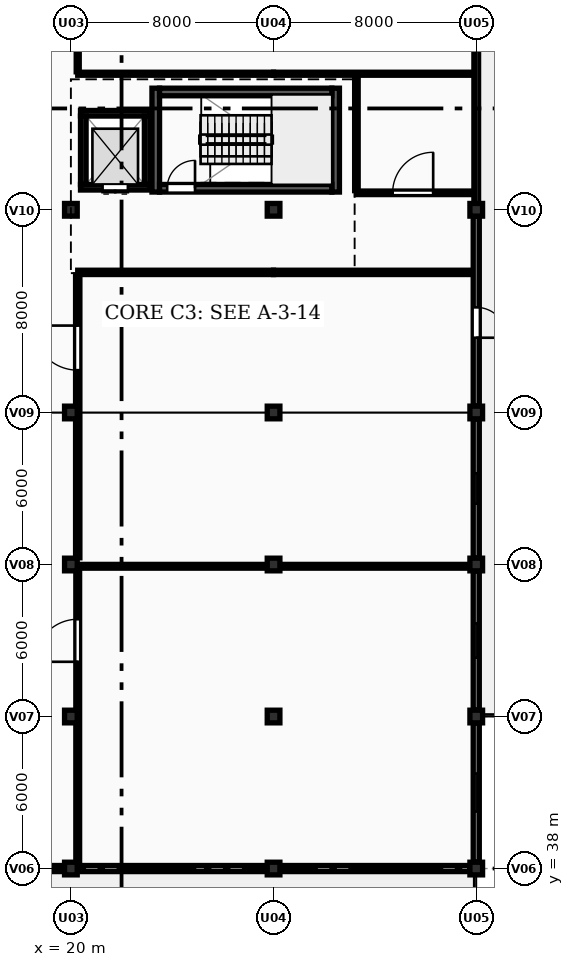
"""IFC4 building model, lengths in metres.
Left out: names, types, materials, properties, quantities, classifications, styles, units other than length and angle.
Written with IfcOpenShell. Run it as: python <this file> out.ifc"""

import sys

from ifc_helpers import new_model, si_unit, direction, frame, frame_2d, origin, origin_2d, place, context, subcontext, project, spatial, rectangle, extrude, element, fill, save


model = new_model("IFC4")
c1 = context("Model", 3, precision=1e-05, world=origin(), true_north=direction((0.0, 1.0)))
c2 = subcontext(c1, "Body", "Model", "MODEL_VIEW")
j1 = project(units=[si_unit("LENGTHUNIT", "METRE"), si_unit("PLANEANGLEUNIT", "RADIAN")], contexts=[c1])
p1 = place(None, origin())
s1 = spatial("IfcSite", under=j1, at=p1, CompositionType="ELEMENT")
p2 = place(p1, origin())
s2 = spatial("IfcBuilding", under=s1, at=p2, CompositionType="ELEMENT")
p3 = place(p2, frame((0.0, 0.0, 4.5)))
s3 = spatial("IfcBuildingStorey", under=s2, at=p3, CompositionType="ELEMENT", Elevation=4.5)
for number, where, z_axis, x_axis in (
    (1, (20.0, 38.0, 0.0), (0.0, 0.0, 1.0), (1.0, 0.0, 0.0)),
    (2, (20.0, 44.0, 0.0), (0.0, 0.0, 1.0), (1.0, 0.0, 0.0)),
    (3, (20.0, 50.0, 0.0), (0.0, 0.0, 1.0), (1.0, 0.0, 0.0)),
    (4, (20.0, 56.0, 0.0), (0.0, 0.0, 1.0), (1.0, 0.0, 0.0)),
    (5, (20.0, 64.0, 0.0), (0.0, 0.0, 1.0), (1.0, 0.0, 0.0)),
    (6, (28.0, 38.0, 0.0), (0.0, 0.0, 1.0), (1.0, 0.0, 0.0)),
    (7, (28.0, 44.0, 0.0), (0.0, 0.0, 1.0), (1.0, 0.0, 0.0)),
    (8, (28.0, 50.0, 0.0), (0.0, 0.0, 1.0), (1.0, 0.0, 0.0)),
    (9, (28.0, 56.0, 0.0), (0.0, 0.0, 1.0), (1.0, 0.0, 0.0)),
    (10, (28.0, 64.0, 0.0), (0.0, 0.0, 1.0), (1.0, 0.0, 0.0)),
    (11, (36.0, 38.0, 0.0), (0.0, 0.0, 1.0), (1.0, 0.0, 0.0)),
    (12, (36.0, 44.0, 0.0), (0.0, 0.0, 1.0), (1.0, 0.0, 0.0)),
    (13, (36.0, 50.0, 0.0), (0.0, 0.0, 1.0), (1.0, 0.0, 0.0)),
    (14, (36.0, 56.0, 0.0), (0.0, 0.0, 1.0), (1.0, 0.0, 0.0)),
    (15, (36.0, 64.0, 0.0), (0.0, 0.0, 1.0), (1.0, 0.0, 0.0)),
):
    element("IfcColumn", number, at=place(p3, frame(where, z_axis=z_axis, x_axis=x_axis)), inside=s3, PredefinedType="COLUMN", context=c2, shape_type="SweptSolid", body=[
        extrude(rectangle(XDim=0.5, YDim=0.5, at=origin_2d()), origin(), (0.0, 0.0, 1.0), 3.9),
    ])
p4 = place(p3, frame((36.0, 71.75, 0.0), z_axis=(0.0, 0.0, 1.0), x_axis=(0.0, -1.0, 0.0)))
e16 = element("IfcWall", 16, at=p4, inside=s3, PredefinedType="SOLIDWALL", context=c2, shape_type="SweptSolid", body=[
    extrude(rectangle(XDim=7.5, YDim=0.185, at=frame_2d((3.75, 0.0))), origin(), (0.0, 0.0, 1.0), 0.95),
])
p5 = place(p3, frame((36.0, 63.75, 0.0), z_axis=(0.0, 0.0, 1.0), x_axis=(0.0, -1.0, 0.0)))
e17 = element("IfcWall", 17, at=p5, inside=s3, PredefinedType="SOLIDWALL", context=c2, shape_type="SweptSolid", body=[
    extrude(rectangle(XDim=7.5, YDim=0.24, at=frame_2d((3.75, 0.0))), origin(), (0.0, 0.0, 1.0), 3.0),
])
p6 = place(p5, frame((3.6, 0.0, 0.0)))
e18 = element("IfcOpeningElement", 18, at=p6, cuts=e17, PredefinedType="OPENING", context=c2, shape_type="SweptSolid", body=[
    extrude(rectangle(XDim=1.2, YDim=2.15, at=frame_2d((0.6, 1.075))), frame((0.0, 0.13, 0.0), z_axis=(0.0, -1.0, 0.0), x_axis=(1.0, 0.0, 0.0)), (0.0, 0.0, 1.0), 0.26),
])
p7 = place(p3, frame((36.0, 55.75, 0.0), z_axis=(0.0, 0.0, 1.0), x_axis=(0.0, -1.0, 0.0)))
e19 = element("IfcWall", 19, at=p7, inside=s3, PredefinedType="SOLIDWALL", context=c2, shape_type="SweptSolid", body=[
    extrude(rectangle(XDim=5.5, YDim=0.24, at=frame_2d((2.75, 0.0))), origin(), (0.0, 0.0, 1.0), 3.0),
])
p8 = place(p7, frame((2.15, 0.0, 0.95)))
e20 = element("IfcOpeningElement", 20, at=p8, cuts=e19, PredefinedType="OPENING", context=c2, shape_type="SweptSolid", body=[
    extrude(rectangle(XDim=1.2, YDim=1.5, at=frame_2d((0.6, 0.75))), frame((0.0, 0.13, 0.0), z_axis=(0.0, -1.0, 0.0), x_axis=(1.0, 0.0, 0.0)), (0.0, 0.0, 1.0), 0.26),
])
p9 = place(p3, frame((36.0, 49.75, 0.0), z_axis=(0.0, 0.0, 1.0), x_axis=(0.0, -1.0, 0.0)))
e21 = element("IfcWall", 21, at=p9, inside=s3, PredefinedType="SOLIDWALL", context=c2, shape_type="SweptSolid", body=[
    extrude(rectangle(XDim=5.5, YDim=0.24, at=frame_2d((2.75, 0.0))), origin(), (0.0, 0.0, 1.0), 3.0),
])
p10 = place(p9, frame((2.075, 0.0, 0.95)))
e22 = element("IfcOpeningElement", 22, at=p10, cuts=e21, PredefinedType="OPENING", context=c2, shape_type="SweptSolid", body=[
    extrude(rectangle(XDim=1.35, YDim=1.5, at=frame_2d((0.675, 0.75))), frame((0.0, 0.13, 0.0), z_axis=(0.0, -1.0, 0.0), x_axis=(1.0, 0.0, 0.0)), (0.0, 0.0, 1.0), 0.26),
])
p11 = place(p3, frame((36.0, 43.75, 0.0), z_axis=(0.0, 0.0, 1.0), x_axis=(0.0, -1.0, 0.0)))
e23 = element("IfcWall", 23, at=p11, inside=s3, PredefinedType="SOLIDWALL", context=c2, shape_type="SweptSolid", body=[
    extrude(rectangle(XDim=5.5, YDim=0.24, at=frame_2d((2.75, 0.0))), origin(), (0.0, 0.0, 1.0), 2.998),
])
p12 = place(p11, frame((2.0, 0.0, 0.95)))
e24 = element("IfcOpeningElement", 24, at=p12, cuts=e23, PredefinedType="OPENING", context=c2, shape_type="SweptSolid", body=[
    extrude(rectangle(XDim=1.5, YDim=1.5, at=frame_2d((0.75, 0.75))), frame((0.0, 0.13, 0.0), z_axis=(0.0, -1.0, 0.0), x_axis=(1.0, 0.0, 0.0)), (0.0, 0.0, 1.0), 0.26),
])
p13 = place(p3, frame((35.75, 38.0, 0.0), z_axis=(0.0, 0.0, 1.0), x_axis=(-1.0, 0.0, 0.0)))
e25 = element("IfcWall", 25, at=p13, inside=s3, PredefinedType="SOLIDWALL", context=c2, shape_type="SweptSolid", body=[
    extrude(rectangle(XDim=7.5, YDim=0.24, at=frame_2d((3.75, 0.0))), origin(), (0.0, 0.0, 1.0), 2.998),
])
p14 = place(p13, frame((2.925, 0.0, 0.95)))
e26 = element("IfcOpeningElement", 26, at=p14, cuts=e25, PredefinedType="OPENING", context=c2, shape_type="SweptSolid", body=[
    extrude(rectangle(XDim=1.65, YDim=1.5, at=frame_2d((0.825, 0.75))), frame((0.0, 0.13, 0.0), z_axis=(0.0, -1.0, 0.0), x_axis=(1.0, 0.0, 0.0)), (0.0, 0.0, 1.0), 0.26),
])
p15 = place(p3, frame((27.75, 38.0, 0.0), z_axis=(0.0, 0.0, 1.0), x_axis=(-1.0, 0.0, 0.0)))
e27 = element("IfcWall", 27, at=p15, inside=s3, PredefinedType="SOLIDWALL", context=c2, shape_type="SweptSolid", body=[
    extrude(rectangle(XDim=7.5, YDim=0.24, at=frame_2d((3.75, 0.0))), origin(), (0.0, 0.0, 1.0), 2.998),
])
p16 = place(p15, frame((2.85, 0.0, 0.95)))
e28 = element("IfcOpeningElement", 28, at=p16, cuts=e27, PredefinedType="OPENING", context=c2, shape_type="SweptSolid", body=[
    extrude(rectangle(XDim=1.8, YDim=1.5, at=frame_2d((0.9, 0.75))), frame((0.0, 0.13, 0.0), z_axis=(0.0, -1.0, 0.0), x_axis=(1.0, 0.0, 0.0)), (0.0, 0.0, 1.0), 0.26),
])
p17 = place(p3, frame((19.75, 38.0, 0.0), z_axis=(0.0, 0.0, 1.0), x_axis=(-1.0, 0.0, 0.0)))
e29 = element("IfcWall", 29, at=p17, inside=s3, PredefinedType="SOLIDWALL", context=c2, shape_type="SweptSolid", body=[
    extrude(rectangle(XDim=7.5, YDim=0.24, at=frame_2d((3.75, 0.0))), origin(), (0.0, 0.0, 1.0), 2.998),
])
for number, where, z_axis, x_axis in (
    (30, (23.35, 64.7, 0.0), (0.0, 0.0, 1.0), (0.0, 1.0, 0.0)),
    (31, (30.45, 68.8, 0.0), (0.0, 0.0, 1.0), (0.0, -1.0, 0.0)),
):
    element("IfcWall", number, at=place(p3, frame(where, z_axis=z_axis, x_axis=x_axis)), inside=s3, PredefinedType="SHEAR", context=c2, shape_type="SweptSolid", body=[
        extrude(rectangle(XDim=4.1, YDim=0.3, at=frame_2d((2.05, 0.0))), origin(), (0.0, 0.0, 1.0), 3.65),
    ])
p18 = place(p3, frame((23.5, 64.85, 0.0), z_axis=(0.0, 0.0, 1.0), x_axis=(1.0, 0.0, 0.0)))
e32 = element("IfcWall", 32, at=p18, inside=s3, PredefinedType="SHEAR", context=c2, shape_type="SweptSolid", body=[
    extrude(rectangle(XDim=6.8, YDim=0.3, at=frame_2d((3.4, 0.0))), origin(), (0.0, 0.0, 1.0), 3.65),
])
p19 = place(p18, frame((0.3, 0.0, 0.0)))
e33 = element("IfcOpeningElement", 33, at=p19, cuts=e32, PredefinedType="OPENING", context=c2, shape_type="SweptSolid", body=[
    extrude(rectangle(XDim=1.1, YDim=2.15, at=frame_2d((0.55, 1.075))), frame((0.0, 0.16, 0.0), z_axis=(0.0, -1.0, 0.0), x_axis=(1.0, 0.0, 0.0)), (0.0, 0.0, 1.0), 0.32),
])
p20 = place(p3, frame((30.3, 68.65, 0.0), z_axis=(0.0, 0.0, 1.0), x_axis=(-1.0, 0.0, 0.0)))
e34 = element("IfcWall", 34, at=p20, inside=s3, PredefinedType="SHEAR", context=c2, shape_type="SweptSolid", body=[
    extrude(rectangle(XDim=6.8, YDim=0.3, at=frame_2d((3.4, 0.0))), origin(), (0.0, 0.0, 1.0), 3.65),
])
p21 = place(p3, frame((23.12, 64.89, 0.0), z_axis=(0.0, 0.0, 1.0), x_axis=(-1.0, 0.0, 0.0)))
e35 = element("IfcWall", 35, at=p21, inside=s3, PredefinedType="SHEAR", context=c2, shape_type="SweptSolid", body=[
    extrude(rectangle(XDim=2.74, YDim=0.22, at=frame_2d((1.37, 0.0))), origin(), (0.0, 0.0, 1.0), 3.65),
])
p22 = place(p21, frame((0.87, 0.0, 0.0)))
e36 = element("IfcOpeningElement", 36, at=p22, cuts=e35, PredefinedType="OPENING", context=c2, shape_type="SweptSolid", body=[
    extrude(rectangle(XDim=1.0, YDim=2.15, at=frame_2d((0.5, 1.075))), frame((0.0, 0.12, 0.0), z_axis=(0.0, -1.0, 0.0), x_axis=(1.0, 0.0, 0.0)), (0.0, 0.0, 1.0), 0.24),
])
p23 = place(p3, frame((20.38, 67.81, 0.0), z_axis=(0.0, 0.0, 1.0), x_axis=(1.0, 0.0, 0.0)))
e37 = element("IfcWall", 37, at=p23, inside=s3, PredefinedType="SHEAR", context=c2, shape_type="SweptSolid", body=[
    extrude(rectangle(XDim=2.74, YDim=0.22, at=frame_2d((1.37, 0.0))), origin(), (0.0, 0.0, 1.0), 3.65),
])
for number, where, z_axis, x_axis in (
    (38, (20.49, 65.0, 0.0), (0.0, 0.0, 1.0), (0.0, 1.0, 0.0)),
    (39, (23.01, 67.7, 0.0), (0.0, 0.0, 1.0), (0.0, -1.0, 0.0)),
):
    element("IfcWall", number, at=place(p3, frame(where, z_axis=z_axis, x_axis=x_axis)), inside=s3, PredefinedType="SHEAR", context=c2, shape_type="SweptSolid", body=[
        extrude(rectangle(XDim=2.7, YDim=0.22, at=frame_2d((1.35, 0.0))), origin(), (0.0, 0.0, 1.0), 3.65),
    ])
p24 = place(p3, frame((20.27, 69.37, 0.0), z_axis=(0.0, 0.0, 1.0), x_axis=(1.0, 0.0, 0.0)))
e40 = element("IfcWall", 40, at=p24, inside=s3, PredefinedType="PARTITIONING", context=c2, shape_type="SweptSolid", body=[
    extrude(rectangle(XDim=7.73, YDim=0.12, at=frame_2d((3.865, 0.0))), origin(), (0.0, 0.0, 1.0), 3.65),
])
p25 = place(p3, frame((28.0, 69.37, 0.0), z_axis=(0.0, 0.0, 1.0), x_axis=(1.0, 0.0, 0.0)))
e41 = element("IfcWall", 41, at=p25, inside=s3, PredefinedType="PARTITIONING", context=c2, shape_type="SweptSolid", body=[
    extrude(rectangle(XDim=7.865, YDim=0.12, at=frame_2d((3.933, 0.0))), origin(), (0.0, 0.0, 1.0), 3.65),
])
p26 = place(p3, frame((20.27, 69.445, 0.0), z_axis=(0.0, 0.0, 1.0), x_axis=(0.0, 1.0, 0.0)))
e42 = element("IfcWall", 42, at=p26, inside=s3, PredefinedType="PARTITIONING", context=c2, shape_type="SweptSolid", body=[
    extrude(rectangle(XDim=2.29, YDim=0.12, at=frame_2d((1.145, 0.0))), origin(), (0.0, 0.0, 1.0), 3.0),
])
p27 = place(p3, frame((31.27, 64.67, 0.0), z_axis=(0.0, 0.0, 1.0), x_axis=(1.0, 0.0, 0.0)))
e43 = element("IfcWall", 43, at=p27, inside=s3, PredefinedType="PARTITIONING", context=c2, shape_type="SweptSolid", body=[
    extrude(rectangle(XDim=4.595, YDim=0.14, at=frame_2d((2.298, 0.0))), origin(), (0.0, 0.0, 1.0), 3.65),
])
p28 = place(p27, frame((1.43, 0.0, 0.0)))
e44 = element("IfcOpeningElement", 44, at=p28, cuts=e43, PredefinedType="OPENING", context=c2, shape_type="SweptSolid", body=[
    extrude(rectangle(XDim=1.6, YDim=2.2, at=frame_2d((0.8, 1.1))), frame((0.0, 0.08, 0.0), z_axis=(0.0, -1.0, 0.0), x_axis=(1.0, 0.0, 0.0)), (0.0, 0.0, 1.0), 0.16),
])
p29 = place(p3, frame((31.27, 64.755, 0.0), z_axis=(0.0, 0.0, 1.0), x_axis=(0.0, 1.0, 0.0)))
e45 = element("IfcWall", 45, at=p29, inside=s3, PredefinedType="PARTITIONING", context=c2, shape_type="SweptSolid", body=[
    extrude(rectangle(XDim=4.475, YDim=0.14, at=frame_2d((2.238, 0.0))), origin(), (0.0, 0.0, 1.0), 3.65),
])
for number, where, z_axis, x_axis in (
    (46, (20.27, 49.93, 0.0), (0.0, 0.0, 1.0), (1.0, 0.0, 0.0)),
    (47, (28.265, 49.93, 0.0), (0.0, 0.0, 1.0), (1.0, 0.0, 0.0)),
):
    element("IfcWall", number, at=place(p3, frame(where, z_axis=z_axis, x_axis=x_axis)), inside=s3, PredefinedType="PARTITIONING", context=c2, shape_type="SweptSolid", body=[
        extrude(rectangle(XDim=7.465, YDim=0.15, at=frame_2d((3.732, 0.0))), origin(), (0.0, 0.0, 1.0), 3.0),
    ])
p30 = place(p3, frame((20.27, 38.265, 0.0), z_axis=(0.0, 0.0, 1.0), x_axis=(0.0, 1.0, 0.0)))
e48 = element("IfcWall", 48, at=p30, inside=s3, PredefinedType="PARTITIONING", context=c2, shape_type="SweptSolid", body=[
    extrude(rectangle(XDim=11.47, YDim=0.15, at=frame_2d((5.735, 0.0))), origin(), (0.0, 0.0, 1.0), 2.998),
])
p31 = place(p30, frame((7.895, 0.0, 0.0)))
e49 = element("IfcOpeningElement", 49, at=p31, cuts=e48, PredefinedType="OPENING", context=c2, shape_type="SweptSolid", body=[
    extrude(rectangle(XDim=1.68, YDim=2.2, at=frame_2d((0.84, 1.1))), frame((0.0, 0.085, 0.0), z_axis=(0.0, -1.0, 0.0), x_axis=(1.0, 0.0, 0.0)), (0.0, 0.0, 1.0), 0.17),
])
p32 = place(p3, frame((20.27, 61.53, 0.0), z_axis=(0.0, 0.0, 1.0), x_axis=(1.0, 0.0, 0.0)))
e50 = element("IfcWall", 50, at=p32, inside=s3, PredefinedType="PARTITIONING", context=c2, shape_type="SweptSolid", body=[
    extrude(rectangle(XDim=7.73, YDim=0.17, at=frame_2d((3.865, 0.0))), origin(), (0.0, 0.0, 1.0), 3.65),
])
p33 = place(p3, frame((28.0, 61.53, 0.0), z_axis=(0.0, 0.0, 1.0), x_axis=(1.0, 0.0, 0.0)))
e51 = element("IfcWall", 51, at=p33, inside=s3, PredefinedType="PARTITIONING", context=c2, shape_type="SweptSolid", body=[
    extrude(rectangle(XDim=7.838, YDim=0.17, at=frame_2d((3.919, 0.0))), origin(), (0.0, 0.0, 1.0), 3.65),
])
p34 = place(p3, frame((20.27, 50.265, 0.0), z_axis=(0.0, 0.0, 1.0), x_axis=(0.0, 1.0, 0.0)))
e52 = element("IfcWall", 52, at=p34, inside=s3, PredefinedType="PARTITIONING", context=c2, shape_type="SweptSolid", body=[
    extrude(rectangle(XDim=11.165, YDim=0.17, at=frame_2d((5.583, 0.0))), origin(), (0.0, 0.0, 1.0), 3.0),
])
p35 = place(p34, frame((7.405, 0.0, 0.0)))
e53 = element("IfcOpeningElement", 53, at=p35, cuts=e52, PredefinedType="OPENING", context=c2, shape_type="SweptSolid", body=[
    extrude(rectangle(XDim=1.76, YDim=2.2, at=frame_2d((0.88, 1.1))), frame((0.0, 0.095, 0.0), z_axis=(0.0, -1.0, 0.0), x_axis=(1.0, 0.0, 0.0)), (0.0, 0.0, 1.0), 0.19),
])
p36 = place(p6, origin())
e54 = element("IfcDoor", 54, at=p36, inside=s3, OperationType="SINGLE_SWING_RIGHT", PredefinedType="DOOR", context=c2, shape_type="SweptSolid", body=[
    extrude(rectangle(XDim=1.2, YDim=2.15, at=frame_2d((0.6, 1.075))), frame((0.0, 0.025, 0.0), z_axis=(0.0, -1.0, 0.0), x_axis=(1.0, 0.0, 0.0)), (0.0, 0.0, 1.0), 0.05),
])
fill(e18, e54)
p37 = place(p8, origin())
e55 = element("IfcWindow", 55, at=p37, inside=s3, PartitioningType="SINGLE_PANEL", PredefinedType="WINDOW", context=c2, shape_type="SweptSolid", body=[
    extrude(rectangle(XDim=1.2, YDim=1.5, at=frame_2d((0.6, 0.75))), frame((0.0, 0.03, 0.0), z_axis=(0.0, -1.0, 0.0), x_axis=(1.0, 0.0, 0.0)), (0.0, 0.0, 1.0), 0.06),
])
fill(e20, e55)
p38 = place(p10, origin())
e56 = element("IfcWindow", 56, at=p38, inside=s3, PartitioningType="SINGLE_PANEL", PredefinedType="WINDOW", context=c2, shape_type="SweptSolid", body=[
    extrude(rectangle(XDim=1.35, YDim=1.5, at=frame_2d((0.675, 0.75))), frame((0.0, 0.03, 0.0), z_axis=(0.0, -1.0, 0.0), x_axis=(1.0, 0.0, 0.0)), (0.0, 0.0, 1.0), 0.06),
])
fill(e22, e56)
p39 = place(p12, origin())
e57 = element("IfcWindow", 57, at=p39, inside=s3, PartitioningType="SINGLE_PANEL", PredefinedType="WINDOW", context=c2, shape_type="SweptSolid", body=[
    extrude(rectangle(XDim=1.5, YDim=1.5, at=frame_2d((0.75, 0.75))), frame((0.0, 0.03, 0.0), z_axis=(0.0, -1.0, 0.0), x_axis=(1.0, 0.0, 0.0)), (0.0, 0.0, 1.0), 0.06),
])
fill(e24, e57)
p40 = place(p14, origin())
e58 = element("IfcWindow", 58, at=p40, inside=s3, PartitioningType="DOUBLE_PANEL_VERTICAL", PredefinedType="WINDOW", context=c2, shape_type="SweptSolid", body=[
    extrude(rectangle(XDim=1.65, YDim=1.5, at=frame_2d((0.825, 0.75))), frame((0.0, 0.03, 0.0), z_axis=(0.0, -1.0, 0.0), x_axis=(1.0, 0.0, 0.0)), (0.0, 0.0, 1.0), 0.06),
])
fill(e26, e58)
p41 = place(p16, origin())
e59 = element("IfcWindow", 59, at=p41, inside=s3, PartitioningType="DOUBLE_PANEL_VERTICAL", PredefinedType="WINDOW", context=c2, shape_type="SweptSolid", body=[
    extrude(rectangle(XDim=1.8, YDim=1.5, at=frame_2d((0.9, 0.75))), frame((0.0, 0.03, 0.0), z_axis=(0.0, -1.0, 0.0), x_axis=(1.0, 0.0, 0.0)), (0.0, 0.0, 1.0), 0.06),
])
fill(e28, e59)
p42 = place(p19, origin())
e60 = element("IfcDoor", 60, at=p42, inside=s3, OperationType="SINGLE_SWING_RIGHT", PredefinedType="DOOR", context=c2, shape_type="SweptSolid", body=[
    extrude(rectangle(XDim=1.1, YDim=2.15, at=frame_2d((0.55, 1.075))), frame((0.0, 0.025, 0.0), z_axis=(0.0, -1.0, 0.0), x_axis=(1.0, 0.0, 0.0)), (0.0, 0.0, 1.0), 0.05),
])
fill(e33, e60)
p43 = place(p22, origin())
e61 = element("IfcDoor", 61, at=p43, inside=s3, OperationType="DOUBLE_DOOR_SLIDING", PredefinedType="DOOR", context=c2, shape_type="SweptSolid", body=[
    extrude(rectangle(XDim=1.0, YDim=2.15, at=frame_2d((0.5, 1.075))), frame((0.0, 0.025, 0.0), z_axis=(0.0, -1.0, 0.0), x_axis=(1.0, 0.0, 0.0)), (0.0, 0.0, 1.0), 0.05),
])
fill(e36, e61)
p44 = place(p28, origin())
e62 = element("IfcDoor", 62, at=p44, inside=s3, OperationType="SINGLE_SWING_RIGHT", PredefinedType="DOOR", context=c2, shape_type="SweptSolid", body=[
    extrude(rectangle(XDim=1.6, YDim=2.2, at=frame_2d((0.8, 1.1))), frame((0.0, 0.025, 0.0), z_axis=(0.0, -1.0, 0.0), x_axis=(1.0, 0.0, 0.0)), (0.0, 0.0, 1.0), 0.05),
])
fill(e44, e62)
p45 = place(p31, origin())
e63 = element("IfcDoor", 63, at=p45, inside=s3, OperationType="SINGLE_SWING_LEFT", PredefinedType="DOOR", context=c2, shape_type="SweptSolid", body=[
    extrude(rectangle(XDim=1.68, YDim=2.2, at=frame_2d((0.84, 1.1))), frame((0.0, 0.025, 0.0), z_axis=(0.0, -1.0, 0.0), x_axis=(1.0, 0.0, 0.0)), (0.0, 0.0, 1.0), 0.05),
])
fill(e49, e63)
p46 = place(p35, origin())
e64 = element("IfcDoor", 64, at=p46, inside=s3, OperationType="SINGLE_SWING_RIGHT", PredefinedType="DOOR", context=c2, shape_type="SweptSolid", body=[
    extrude(rectangle(XDim=1.76, YDim=2.2, at=frame_2d((0.88, 1.1))), frame((0.0, 0.025, 0.0), z_axis=(0.0, -1.0, 0.0), x_axis=(1.0, 0.0, 0.0)), (0.0, 0.0, 1.0), 0.05),
])
fill(e53, e64)
save(model, sys.argv[1])
